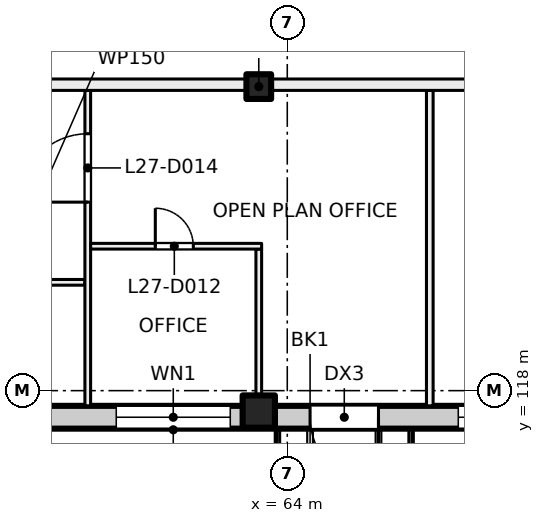
"""IFC4 building model, lengths in metres.
Left out: names, types, materials, properties, quantities, classifications, styles, units other than length and angle.
Written with IfcOpenShell. Run it as: python <this file> out.ifc"""

import sys

from ifc_helpers import new_model, si_unit, direction, frame, frame_2d, origin, origin_2d, place, context, subcontext, project, spatial, rectangle, extrude, element, fill, save


model = new_model("IFC4")
c1 = context("Model", 3, precision=1e-05, world=origin(), true_north=direction((0.0, 1.0)))
c2 = subcontext(c1, "Body", "Model", "MODEL_VIEW")
j1 = project(units=[si_unit("LENGTHUNIT", "METRE"), si_unit("PLANEANGLEUNIT", "RADIAN")], contexts=[c1])
p1 = place(None, origin())
s1 = spatial("IfcSite", under=j1, at=p1, CompositionType="ELEMENT")
p2 = place(p1, origin())
s2 = spatial("IfcBuilding", under=s1, at=p2, CompositionType="ELEMENT")
p3 = place(p2, frame((0.0, 0.0, 117.0)))
s3 = spatial("IfcBuildingStorey", under=s2, at=p3, CompositionType="ELEMENT", Elevation=117.0)
p4 = place(p3, frame((63.25, 126.0, 0.0), z_axis=(0.0, 0.0, 1.0), x_axis=(1.0, 0.0, 0.0)))
e1 = element("IfcColumn", 1, at=p4, inside=s3, PredefinedType="COLUMN", context=c2, shape_type="SweptSolid", body=[
    extrude(rectangle(XDim=0.65, YDim=0.65, at=origin_2d()), origin(), (0.0, 0.0, 1.0), 4.0),
])
p5 = place(p3, frame((63.25, 117.45, 0.0), z_axis=(0.0, 0.0, 1.0), x_axis=(1.0, 0.0, 0.0)))
e2 = element("IfcColumn", 2, at=p5, inside=s3, PredefinedType="COLUMN", context=c2, shape_type="SweptSolid", body=[
    extrude(rectangle(XDim=0.85, YDim=0.85, at=origin_2d()), origin(), (0.0, 0.0, 1.0), 4.0),
])
p6 = place(p3, frame((90.98, 117.3, 0.0), z_axis=(0.0, 0.0, 1.0), x_axis=(-1.0, 0.0, 0.0)))
e3 = element("IfcWall", 3, at=p6, inside=s3, PredefinedType="SOLIDWALL", context=c2, shape_type="SweptSolid", body=[
    extrude(rectangle(XDim=33.745, YDim=0.6, at=frame_2d((16.873, 0.0))), origin(), (0.0, 0.0, 1.0), 3.625),
])
p7 = place(p6, frame((1.48, 0.0, 0.9)))
e4 = element("IfcOpeningElement", 4, at=p7, cuts=e3, PredefinedType="OPENING", context=c2, shape_type="SweptSolid", body=[
    extrude(rectangle(XDim=3.0, YDim=2.4, at=frame_2d((1.5, 1.2))), frame((0.0, 0.31, 0.0), z_axis=(0.0, -1.0, 0.0), x_axis=(1.0, 0.0, 0.0)), (0.0, 0.0, 1.0), 0.62),
])
p8 = place(p6, frame((5.98, 0.0, 0.9)))
e5 = element("IfcOpeningElement", 5, at=p8, cuts=e3, PredefinedType="OPENING", context=c2, shape_type="SweptSolid", body=[
    extrude(rectangle(XDim=3.0, YDim=2.4, at=frame_2d((1.5, 1.2))), frame((0.0, 0.31, 0.0), z_axis=(0.0, -1.0, 0.0), x_axis=(1.0, 0.0, 0.0)), (0.0, 0.0, 1.0), 0.62),
])
p9 = place(p6, frame((10.48, 0.0, 0.9)))
e6 = element("IfcOpeningElement", 6, at=p9, cuts=e3, PredefinedType="OPENING", context=c2, shape_type="SweptSolid", body=[
    extrude(rectangle(XDim=3.0, YDim=2.4, at=frame_2d((1.5, 1.2))), frame((0.0, 0.31, 0.0), z_axis=(0.0, -1.0, 0.0), x_axis=(1.0, 0.0, 0.0)), (0.0, 0.0, 1.0), 0.62),
])
p10 = place(p6, frame((14.98, 0.0, 0.9)))
e7 = element("IfcOpeningElement", 7, at=p10, cuts=e3, PredefinedType="OPENING", context=c2, shape_type="SweptSolid", body=[
    extrude(rectangle(XDim=3.0, YDim=2.4, at=frame_2d((1.5, 1.2))), frame((0.0, 0.31, 0.0), z_axis=(0.0, -1.0, 0.0), x_axis=(1.0, 0.0, 0.0)), (0.0, 0.0, 1.0), 0.62),
])
p11 = place(p6, frame((19.48, 0.0, 0.9)))
e8 = element("IfcOpeningElement", 8, at=p11, cuts=e3, PredefinedType="OPENING", context=c2, shape_type="SweptSolid", body=[
    extrude(rectangle(XDim=3.0, YDim=2.4, at=frame_2d((1.5, 1.2))), frame((0.0, 0.31, 0.0), z_axis=(0.0, -1.0, 0.0), x_axis=(1.0, 0.0, 0.0)), (0.0, 0.0, 1.0), 0.62),
])
p12 = place(p6, frame((24.58, 0.0, 0.0)))
e9 = element("IfcOpeningElement", 9, at=p12, cuts=e3, PredefinedType="OPENING", context=c2, shape_type="SweptSolid", body=[
    extrude(rectangle(XDim=1.8, YDim=2.4, at=frame_2d((0.9, 1.2))), frame((0.0, 0.31, 0.0), z_axis=(0.0, -1.0, 0.0), x_axis=(1.0, 0.0, 0.0)), (0.0, 0.0, 1.0), 0.62),
])
p13 = place(p6, frame((28.48, 0.0, 0.9)))
e10 = element("IfcOpeningElement", 10, at=p13, cuts=e3, PredefinedType="OPENING", context=c2, shape_type="SweptSolid", body=[
    extrude(rectangle(XDim=3.0, YDim=2.4, at=frame_2d((1.5, 1.2))), frame((0.0, 0.31, 0.0), z_axis=(0.0, -1.0, 0.0), x_axis=(1.0, 0.0, 0.0)), (0.0, 0.0, 1.0), 0.62),
])
p14 = place(p3, frame((54.325, 120.85, 0.0), z_axis=(0.0, 0.0, 1.0), x_axis=(1.0, 0.0, 0.0)))
e11 = element("IfcWall", 11, at=p14, inside=s3, PredefinedType="PARTITIONING", context=c2, shape_type="SweptSolid", body=[
    extrude(rectangle(XDim=4.35, YDim=0.15, at=frame_2d((2.175, 0.0))), origin(), (0.0, 0.0, 1.0), 3.625),
])
p15 = place(p14, frame((1.675, 0.0, 0.0)))
e12 = element("IfcOpeningElement", 12, at=p15, cuts=e11, PredefinedType="OPENING", context=c2, shape_type="SweptSolid", body=[
    extrude(rectangle(XDim=1.0, YDim=2.1, at=frame_2d((0.5, 1.05))), frame((0.0, 0.085, 0.0), z_axis=(0.0, -1.0, 0.0), x_axis=(1.0, 0.0, 0.0)), (0.0, 0.0, 1.0), 0.17),
])
p16 = place(p3, frame((58.75, 117.6, 0.0), z_axis=(0.0, 0.0, 1.0), x_axis=(0.0, 1.0, 0.0)))
e13 = element("IfcWall", 13, at=p16, inside=s3, PredefinedType="PARTITIONING", context=c2, shape_type="SweptSolid", body=[
    extrude(rectangle(XDim=8.3, YDim=0.15, at=frame_2d((4.15, 0.0))), origin(), (0.0, 0.0, 1.0), 3.625),
])
p17 = place(p16, frame((5.36, 0.0, 0.0)))
e14 = element("IfcOpeningElement", 14, at=p17, cuts=e13, PredefinedType="OPENING", context=c2, shape_type="SweptSolid", body=[
    extrude(rectangle(XDim=1.8, YDim=2.1, at=frame_2d((0.9, 1.05))), frame((0.0, 0.085, 0.0), z_axis=(0.0, -1.0, 0.0), x_axis=(1.0, 0.0, 0.0)), (0.0, 0.0, 1.0), 0.17),
])
p18 = place(p3, frame((63.25, 117.6, 0.0), z_axis=(0.0, 0.0, 1.0), x_axis=(0.0, 1.0, 0.0)))
e15 = element("IfcWall", 15, at=p18, inside=s3, PredefinedType="PARTITIONING", context=c2, shape_type="SweptSolid", body=[
    extrude(rectangle(XDim=4.125, YDim=0.15, at=frame_2d((2.062, 0.0))), origin(), (0.0, 0.0, 1.0), 3.625),
])
p19 = place(p3, frame((58.825, 121.8, 0.0), z_axis=(0.0, 0.0, 1.0), x_axis=(1.0, 0.0, 0.0)))
e16 = element("IfcWall", 16, at=p19, inside=s3, PredefinedType="PARTITIONING", context=c2, shape_type="SweptSolid", body=[
    extrude(rectangle(XDim=4.5, YDim=0.15, at=frame_2d((2.25, 0.0))), origin(), (0.0, 0.0, 1.0), 3.625),
])
p20 = place(p19, frame((1.702, 0.0, 0.0)))
e17 = element("IfcOpeningElement", 17, at=p20, cuts=e16, PredefinedType="OPENING", context=c2, shape_type="SweptSolid", body=[
    extrude(rectangle(XDim=1.0, YDim=2.1, at=frame_2d((0.5, 1.05))), frame((0.0, 0.085, 0.0), z_axis=(0.0, -1.0, 0.0), x_axis=(1.0, 0.0, 0.0)), (0.0, 0.0, 1.0), 0.17),
])
p21 = place(p3, frame((67.75, 117.6, 0.0), z_axis=(0.0, 0.0, 1.0), x_axis=(0.0, 1.0, 0.0)))
e18 = element("IfcWall", 18, at=p21, inside=s3, PredefinedType="PARTITIONING", context=c2, shape_type="SweptSolid", body=[
    extrude(rectangle(XDim=8.3, YDim=0.175, at=frame_2d((4.15, 0.0))), origin(), (0.0, 0.0, 1.0), 3.625),
])
p22 = place(p3, frame((91.0, 126.05, 0.0), z_axis=(0.0, 0.0, 1.0), x_axis=(-1.0, 0.0, 0.0)))
e19 = element("IfcWall", 19, at=p22, inside=s3, PredefinedType="PARTITIONING", context=c2, shape_type="SweptSolid", body=[
    extrude(rectangle(XDim=43.785, YDim=0.3, at=frame_2d((21.893, 0.0))), origin(), (0.0, 0.0, 1.0), 3.625),
])
p23 = place(p22, frame((7.0, 0.0, 0.0)))
e20 = element("IfcOpeningElement", 20, at=p23, cuts=e19, PredefinedType="OPENING", context=c2, shape_type="SweptSolid", body=[
    extrude(rectangle(XDim=1.0, YDim=2.1, at=frame_2d((0.5, 1.05))), frame((0.0, 0.16, 0.0), z_axis=(0.0, -1.0, 0.0), x_axis=(1.0, 0.0, 0.0)), (0.0, 0.0, 1.0), 0.32),
])
p24 = place(p22, frame((15.6, 0.0, 0.0)))
e21 = element("IfcOpeningElement", 21, at=p24, cuts=e19, PredefinedType="OPENING", context=c2, shape_type="SweptSolid", body=[
    extrude(rectangle(XDim=1.8, YDim=2.1, at=frame_2d((0.9, 1.05))), frame((0.0, 0.16, 0.0), z_axis=(0.0, -1.0, 0.0), x_axis=(1.0, 0.0, 0.0)), (0.0, 0.0, 1.0), 0.32),
])
p25 = place(p22, frame((34.0, 0.0, 0.0)))
e22 = element("IfcOpeningElement", 22, at=p25, cuts=e19, PredefinedType="OPENING", context=c2, shape_type="SweptSolid", body=[
    extrude(rectangle(XDim=1.0, YDim=2.1, at=frame_2d((0.5, 1.05))), frame((0.0, 0.16, 0.0), z_axis=(0.0, -1.0, 0.0), x_axis=(1.0, 0.0, 0.0)), (0.0, 0.0, 1.0), 0.32),
])
p26 = place(p22, frame((39.296, 0.0, 0.0)))
e23 = element("IfcOpeningElement", 23, at=p26, cuts=e19, PredefinedType="OPENING", context=c2, shape_type="SweptSolid", body=[
    extrude(rectangle(XDim=1.8, YDim=2.1, at=frame_2d((0.9, 1.05))), frame((0.0, 0.16, 0.0), z_axis=(0.0, -1.0, 0.0), x_axis=(1.0, 0.0, 0.0)), (0.0, 0.0, 1.0), 0.32),
])
p27 = place(p11, origin())
e24 = element("IfcWindow", 24, at=p27, inside=s3, PartitioningType="SINGLE_PANEL", PredefinedType="WINDOW", context=c2, shape_type="SweptSolid", body=[
    extrude(rectangle(XDim=3.0, YDim=2.4, at=frame_2d((1.5, 1.2))), frame((0.0, 0.03, 0.0), z_axis=(0.0, -1.0, 0.0), x_axis=(1.0, 0.0, 0.0)), (0.0, 0.0, 1.0), 0.06),
])
fill(e8, e24)
p28 = place(p12, origin())
e25 = element("IfcDoor", 25, at=p28, inside=s3, OperationType="DOUBLE_DOOR_SINGLE_SWING", PredefinedType="DOOR", context=c2, shape_type="SweptSolid", body=[
    extrude(rectangle(XDim=1.8, YDim=2.4, at=frame_2d((0.9, 1.2))), frame((0.0, 0.025, 0.0), z_axis=(0.0, -1.0, 0.0), x_axis=(1.0, 0.0, 0.0)), (0.0, 0.0, 1.0), 0.05),
])
fill(e9, e25)
p29 = place(p13, origin())
e26 = element("IfcWindow", 26, at=p29, inside=s3, PartitioningType="SINGLE_PANEL", PredefinedType="WINDOW", context=c2, shape_type="SweptSolid", body=[
    extrude(rectangle(XDim=3.0, YDim=2.4, at=frame_2d((1.5, 1.2))), frame((0.0, 0.03, 0.0), z_axis=(0.0, -1.0, 0.0), x_axis=(1.0, 0.0, 0.0)), (0.0, 0.0, 1.0), 0.06),
])
fill(e10, e26)
p30 = place(p20, origin())
e27 = element("IfcDoor", 27, at=p30, inside=s3, OperationType="SINGLE_SWING_LEFT", PredefinedType="DOOR", context=c2, shape_type="SweptSolid", body=[
    extrude(rectangle(XDim=1.0, YDim=2.1, at=frame_2d((0.5, 1.05))), frame((0.0, 0.025, 0.0), z_axis=(0.0, -1.0, 0.0), x_axis=(1.0, 0.0, 0.0)), (0.0, 0.0, 1.0), 0.05),
])
fill(e17, e27)
p31 = place(p17, origin())
e28 = element("IfcDoor", 28, at=p31, inside=s3, OperationType="DOUBLE_DOOR_SINGLE_SWING", PredefinedType="DOOR", context=c2, shape_type="SweptSolid", body=[
    extrude(rectangle(XDim=1.8, YDim=2.1, at=frame_2d((0.9, 1.05))), frame((0.0, 0.025, 0.0), z_axis=(0.0, -1.0, 0.0), x_axis=(1.0, 0.0, 0.0)), (0.0, 0.0, 1.0), 0.05),
])
fill(e14, e28)
save(model, sys.argv[1])
